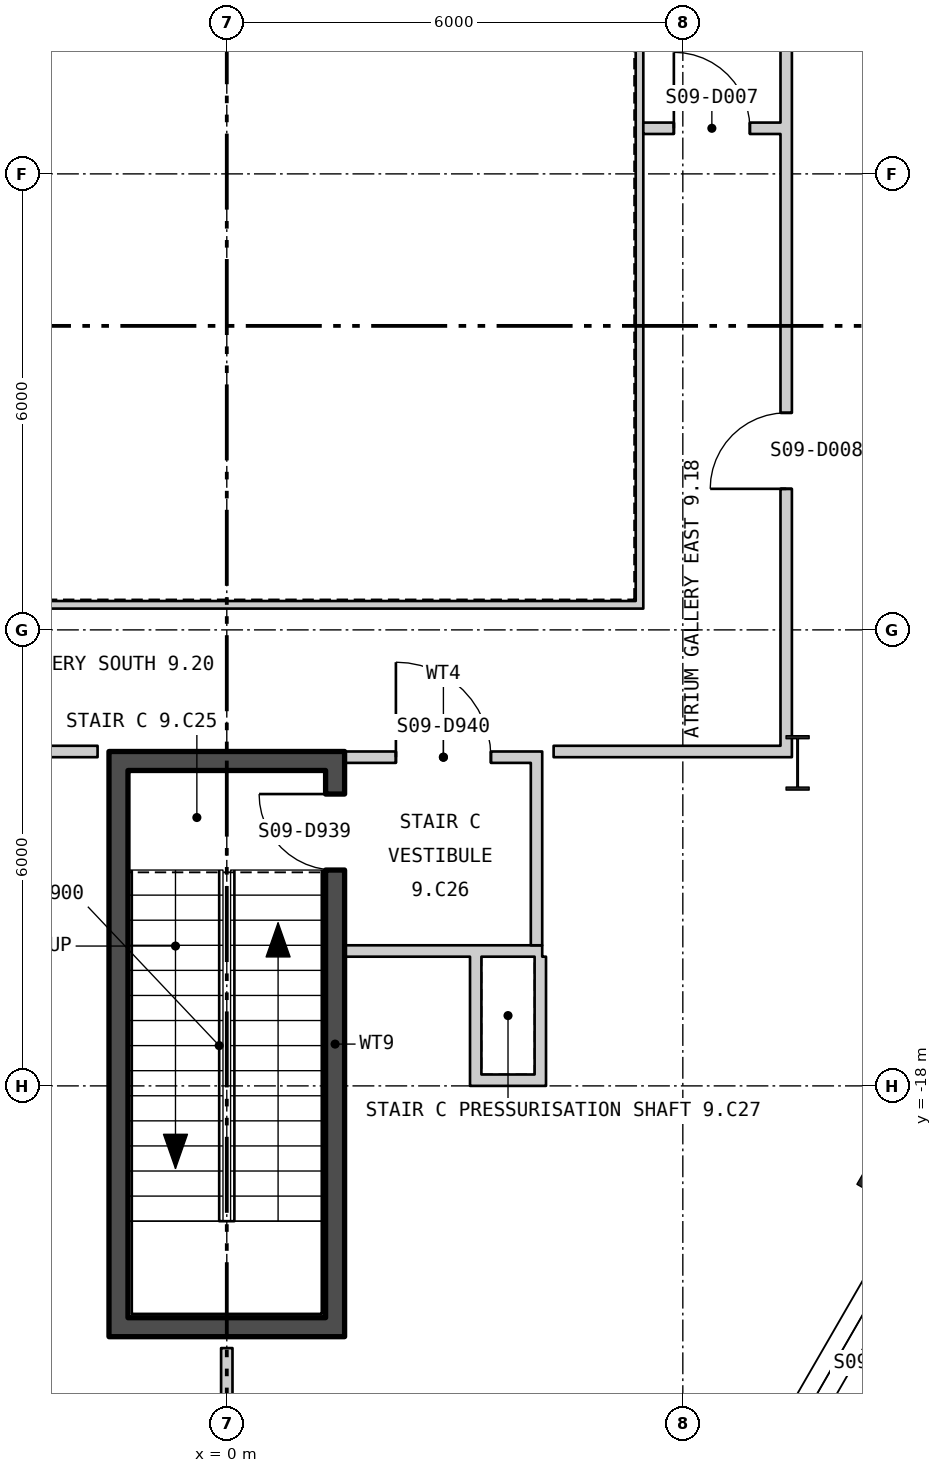
"""IFC4 building model, lengths in metres.
Left out: names, types, materials, properties, quantities, classifications, styles, units other than length and angle.
Written with IfcOpenShell. Run it as: python <this file> out.ifc"""

import sys

from ifc_helpers import new_model, si_unit, direction, frame, frame_2d, origin, origin_2d, place, context, subcontext, project, spatial, polyline, rectangle, hollow_rectangle, i_section, outline, extrude, element, fill, save


model = new_model("IFC4")
c1 = context("Model", 3, precision=1e-05, world=origin(), true_north=direction((0.0, 1.0)))
c2 = subcontext(c1, "Body", "Model", "MODEL_VIEW")
j1 = project(units=[si_unit("LENGTHUNIT", "METRE"), si_unit("PLANEANGLEUNIT", "RADIAN")], contexts=[c1])
p1 = place(None, origin())
s1 = spatial("IfcSite", under=j1, at=p1, CompositionType="ELEMENT")
p2 = place(p1, origin())
s2 = spatial("IfcBuilding", under=s1, at=p2, CompositionType="ELEMENT")
p3 = place(p2, frame((0.0, 0.0, 124.8)))
s3 = spatial("IfcBuildingStorey", under=s2, at=p3, CompositionType="ELEMENT", Elevation=124.8)
p4 = place(p3, frame((8.756, -19.188, 0.0), z_axis=(0.0, 0.0, 1.0), x_axis=(0.5, 0.866025403784, 0.0)))
e1 = element("IfcColumn", 1, at=p4, inside=s3, PredefinedType="COLUMN", context=c2, shape_type="SweptSolid", body=[
    extrude(hollow_rectangle(XDim=0.65, YDim=0.7, WallThickness=0.065, at=origin_2d()), origin(), (0.0, 0.0, 1.0), 4.5),
])
p5 = place(p3, frame((7.51, -13.75, 0.0), z_axis=(0.0, 0.0, 1.0), x_axis=(1.0, 0.0, 0.0)))
e2 = element("IfcColumn", 2, at=p5, inside=s3, PredefinedType="COLUMN", context=c2, shape_type="SweptSolid", body=[
    extrude(i_section(OverallWidth=0.304, OverallDepth=0.716, WebThickness=0.021, FlangeThickness=0.04, at=origin_2d()), origin(), (0.0, 0.0, 1.0), 4.5),
])
p6 = place(p3, frame((4.58, -27.57, -0.18), z_axis=(0.0, 0.0, 1.0), x_axis=(0.500000711659, 0.866024992908, 0.0)))
e3 = element("IfcWall", 3, at=p6, inside=s3, PredefinedType="SOLIDWALL", context=c2, shape_type="SweptSolid", body=[
    extrude(outline(polyline([(-0.13, -0.225), (45.87, -0.225), (45.61, 0.225), (0.13, 0.225), (-0.13, -0.225)])), origin(), (0.0, 0.0, 1.0), 4.28),
])
p7 = place(p6, frame((1.424, 0.0, 1.08)))
e4 = element("IfcOpeningElement", 4, at=p7, cuts=e3, PredefinedType="OPENING", context=c2, shape_type="SweptSolid", body=[
    extrude(rectangle(XDim=2.4, YDim=2.6, at=frame_2d((1.2, 1.3))), frame((0.0, 0.235, 0.0), z_axis=(0.0, -1.0, 0.0), x_axis=(1.0, 0.0, 0.0)), (0.0, 0.0, 1.0), 0.47),
])
p8 = place(p6, frame((5.893, 0.0, 1.08)))
e5 = element("IfcOpeningElement", 5, at=p8, cuts=e3, PredefinedType="OPENING", context=c2, shape_type="SweptSolid", body=[
    extrude(rectangle(XDim=2.4, YDim=2.6, at=frame_2d((1.2, 1.3))), frame((0.0, 0.235, 0.0), z_axis=(0.0, -1.0, 0.0), x_axis=(1.0, 0.0, 0.0)), (0.0, 0.0, 1.0), 0.47),
])
p9 = place(p6, frame((10.401, 0.0, 1.08)))
e6 = element("IfcOpeningElement", 6, at=p9, cuts=e3, PredefinedType="OPENING", context=c2, shape_type="SweptSolid", body=[
    extrude(rectangle(XDim=2.4, YDim=2.6, at=frame_2d((1.2, 1.3))), frame((0.0, 0.235, 0.0), z_axis=(0.0, -1.0, 0.0), x_axis=(1.0, 0.0, 0.0)), (0.0, 0.0, 1.0), 0.47),
])
p10 = place(p6, frame((14.909, 0.0, 1.08)))
e7 = element("IfcOpeningElement", 7, at=p10, cuts=e3, PredefinedType="OPENING", context=c2, shape_type="SweptSolid", body=[
    extrude(rectangle(XDim=2.4, YDim=2.6, at=frame_2d((1.2, 1.3))), frame((0.0, 0.235, 0.0), z_axis=(0.0, -1.0, 0.0), x_axis=(1.0, 0.0, 0.0)), (0.0, 0.0, 1.0), 0.47),
])
p11 = place(p6, frame((19.416, 0.0, 1.08)))
e8 = element("IfcOpeningElement", 8, at=p11, cuts=e3, PredefinedType="OPENING", context=c2, shape_type="SweptSolid", body=[
    extrude(rectangle(XDim=2.4, YDim=2.6, at=frame_2d((1.2, 1.3))), frame((0.0, 0.235, 0.0), z_axis=(0.0, -1.0, 0.0), x_axis=(1.0, 0.0, 0.0)), (0.0, 0.0, 1.0), 0.47),
])
p12 = place(p6, frame((23.924, 0.0, 1.08)))
e9 = element("IfcOpeningElement", 9, at=p12, cuts=e3, PredefinedType="OPENING", context=c2, shape_type="SweptSolid", body=[
    extrude(rectangle(XDim=2.4, YDim=2.6, at=frame_2d((1.2, 1.3))), frame((0.0, 0.235, 0.0), z_axis=(0.0, -1.0, 0.0), x_axis=(1.0, 0.0, 0.0)), (0.0, 0.0, 1.0), 0.47),
])
p13 = place(p6, frame((32.939, 0.0, 1.08)))
e10 = element("IfcOpeningElement", 10, at=p13, cuts=e3, PredefinedType="OPENING", context=c2, shape_type="SweptSolid", body=[
    extrude(rectangle(XDim=2.4, YDim=2.6, at=frame_2d((1.2, 1.3))), frame((0.0, 0.235, 0.0), z_axis=(0.0, -1.0, 0.0), x_axis=(1.0, 0.0, 0.0)), (0.0, 0.0, 1.0), 0.47),
])
p14 = place(p6, frame((37.447, 0.0, 1.08)))
e11 = element("IfcOpeningElement", 11, at=p14, cuts=e3, PredefinedType="OPENING", context=c2, shape_type="SweptSolid", body=[
    extrude(rectangle(XDim=2.4, YDim=2.6, at=frame_2d((1.2, 1.3))), frame((0.0, 0.235, 0.0), z_axis=(0.0, -1.0, 0.0), x_axis=(1.0, 0.0, 0.0)), (0.0, 0.0, 1.0), 0.47),
])
p15 = place(p6, frame((41.916, 0.0, 1.08)))
e12 = element("IfcOpeningElement", 12, at=p15, cuts=e3, PredefinedType="OPENING", context=c2, shape_type="SweptSolid", body=[
    extrude(rectangle(XDim=2.4, YDim=2.6, at=frame_2d((1.2, 1.3))), frame((0.0, 0.235, 0.0), z_axis=(0.0, -1.0, 0.0), x_axis=(1.0, 0.0, 0.0)), (0.0, 0.0, 1.0), 0.47),
])
p16 = place(p3, frame((-5.48, -11.67, 0.0), z_axis=(0.0, 0.0, 1.0), x_axis=(1.0, 0.0, 0.0)))
e13 = element("IfcWall", 13, at=p16, inside=s3, PredefinedType="PARTITIONING", context=c2, shape_type="SweptSolid", body=[
    extrude(rectangle(XDim=10.96, YDim=0.1, at=frame_2d((5.48, 0.0))), origin(), (0.0, 0.0, 1.0), 4.3),
])
p17 = place(p3, frame((5.43, -11.62, 0.0), z_axis=(0.0, 0.0, 1.0), x_axis=(0.0, 1.0, 0.0)))
e14 = element("IfcWall", 14, at=p17, inside=s3, PredefinedType="PARTITIONING", context=c2, shape_type="SweptSolid", body=[
    extrude(rectangle(XDim=8.04, YDim=0.1, at=frame_2d((4.02, 0.0))), origin(), (0.0, 0.0, 1.0), 4.3),
])
p18 = place(p3, frame((-1.425, -21.05, 0.0), z_axis=(0.0, 0.0, 1.0), x_axis=(0.0, 1.0, 0.0)))
e15 = element("IfcWall", 15, at=p18, inside=s3, PredefinedType="SHEAR", context=c2, shape_type="SweptSolid", body=[
    extrude(rectangle(XDim=7.2, YDim=0.25, at=frame_2d((3.6, 0.0))), origin(), (0.0, 0.0, 1.0), 4.3),
])
p19 = place(p3, frame((1.425, -21.05, 0.0), z_axis=(0.0, 0.0, 1.0), x_axis=(0.0, 1.0, 0.0)))
e16 = element("IfcWall", 16, at=p19, inside=s3, PredefinedType="SHEAR", context=c2, shape_type="SweptSolid", body=[
    extrude(rectangle(XDim=7.2, YDim=0.25, at=frame_2d((3.6, 0.0))), origin(), (0.0, 0.0, 1.0), 4.3),
])
p20 = place(p19, frame((5.89, 0.0, 0.0)))
e17 = element("IfcOpeningElement", 17, at=p20, cuts=e16, PredefinedType="OPENING", context=c2, shape_type="SweptSolid", body=[
    extrude(rectangle(XDim=1.0, YDim=2.1, at=frame_2d((0.5, 1.05))), frame((0.0, 0.135, 0.0), z_axis=(0.0, -1.0, 0.0), x_axis=(1.0, 0.0, 0.0)), (0.0, 0.0, 1.0), 0.27),
])
for number, where, z_axis, x_axis in (
    (18, (-1.55, -21.175, 0.0), (0.0, 0.0, 1.0), (1.0, 0.0, 0.0)),
    (19, (-1.55, -13.725, 0.0), (0.0, 0.0, 1.0), (1.0, 0.0, 0.0)),
):
    element("IfcWall", number, at=place(p3, frame(where, z_axis=z_axis, x_axis=x_axis)), inside=s3, PredefinedType="SHEAR", context=c2, shape_type="SweptSolid", body=[
        extrude(rectangle(XDim=3.1, YDim=0.25, at=frame_2d((1.55, 0.0))), origin(), (0.0, 0.0, 1.0), 4.3),
    ])
p21 = place(p3, frame((1.55, -16.225, 0.0), z_axis=(0.0, 0.0, 1.0), x_axis=(1.0, 0.0, 0.0)))
e20 = element("IfcWall", 20, at=p21, inside=s3, PredefinedType="PARTITIONING", context=c2, shape_type="SweptSolid", body=[
    extrude(rectangle(XDim=2.6, YDim=0.15, at=frame_2d((1.3, 0.0))), origin(), (0.0, 0.0, 1.0), 4.3),
])
p22 = place(p3, frame((4.075, -16.15, 0.0), z_axis=(0.0, 0.0, 1.0), x_axis=(0.0, 1.0, 0.0)))
e21 = element("IfcWall", 21, at=p22, inside=s3, PredefinedType="PARTITIONING", context=c2, shape_type="SweptSolid", body=[
    extrude(rectangle(XDim=2.4, YDim=0.15, at=frame_2d((1.2, 0.0))), origin(), (0.0, 0.0, 1.0), 4.3),
])
p23 = place(p3, frame((1.55, -13.675, 0.0), z_axis=(0.0, 0.0, 1.0), x_axis=(1.0, 0.0, 0.0)))
e22 = element("IfcWall", 22, at=p23, inside=s3, PredefinedType="PARTITIONING", context=c2, shape_type="SweptSolid", body=[
    extrude(rectangle(XDim=2.6, YDim=0.15, at=frame_2d((1.3, 0.0))), origin(), (0.0, 0.0, 1.0), 3.39),
])
p24 = place(p23, frame((0.675, 0.0, 0.0)))
e23 = element("IfcOpeningElement", 23, at=p24, cuts=e22, PredefinedType="OPENING", context=c2, shape_type="SweptSolid", body=[
    extrude(rectangle(XDim=1.25, YDim=2.1, at=frame_2d((0.625, 1.05))), frame((0.0, 0.085, 0.0), z_axis=(0.0, -1.0, 0.0), x_axis=(1.0, 0.0, 0.0)), (0.0, 0.0, 1.0), 0.17),
])
p25 = place(p3, frame((3.275, -18.0, 0.0), z_axis=(0.0, 0.0, 1.0), x_axis=(0.0, 1.0, 0.0)))
e24 = element("IfcWall", 24, at=p25, inside=s3, PredefinedType="PARTITIONING", context=c2, shape_type="SweptSolid", body=[
    extrude(rectangle(XDim=1.7, YDim=0.15, at=frame_2d((0.85, 0.0))), origin(), (0.0, 0.0, 1.0), 3.61),
])
p26 = place(p3, frame((3.35, -17.925, 0.0), z_axis=(0.0, 0.0, 1.0), x_axis=(1.0, 0.0, 0.0)))
e25 = element("IfcWall", 25, at=p26, inside=s3, PredefinedType="PARTITIONING", context=c2, shape_type="SweptSolid", body=[
    extrude(rectangle(XDim=0.7, YDim=0.15, at=frame_2d((0.35, 0.0))), origin(), (0.0, 0.0, 1.0), 4.3),
])
p27 = place(p3, frame((4.125, -18.0, 0.0), z_axis=(0.0, 0.0, 1.0), x_axis=(0.0, 1.0, 0.0)))
e26 = element("IfcWall", 26, at=p27, inside=s3, PredefinedType="PARTITIONING", context=c2, shape_type="SweptSolid", body=[
    extrude(rectangle(XDim=1.7, YDim=0.15, at=frame_2d((0.85, 0.0))), origin(), (0.0, 0.0, 1.0), 4.3),
])
p28 = place(p3, frame((-7.285, -13.6, 0.0), z_axis=(0.0, 0.0, 1.0), x_axis=(1.0, 0.0, 0.0)))
e27 = element("IfcWall", 27, at=p28, inside=s3, PredefinedType="PARTITIONING", context=c2, shape_type="SweptSolid", body=[
    extrude(rectangle(XDim=5.585, YDim=0.15, at=frame_2d((2.792, 0.0))), origin(), (0.0, 0.0, 1.0), 3.39),
])
p29 = place(p28, frame((3.224, 0.0, 0.0)))
e28 = element("IfcOpeningElement", 28, at=p29, cuts=e27, PredefinedType="OPENING", context=c2, shape_type="SweptSolid", body=[
    extrude(rectangle(XDim=1.0, YDim=2.1, at=frame_2d((0.5, 1.05))), frame((0.0, 0.085, 0.0), z_axis=(0.0, -1.0, 0.0), x_axis=(1.0, 0.0, 0.0)), (0.0, 0.0, 1.0), 0.17),
])
p30 = place(p3, frame((0.0, -26.895, 0.0), z_axis=(0.0, 0.0, 1.0), x_axis=(0.0, 1.0, 0.0)))
e29 = element("IfcWall", 29, at=p30, inside=s3, PredefinedType="PARTITIONING", context=c2, shape_type="SweptSolid", body=[
    extrude(rectangle(XDim=5.445, YDim=0.15, at=frame_2d((2.723, 0.0))), origin(), (0.0, 0.0, 1.0), 3.7),
])
p31 = place(p3, frame((4.3, -13.6, 0.0), z_axis=(0.0, 0.0, 1.0), x_axis=(1.0, 0.0, 0.0)))
e30 = element("IfcWall", 30, at=p31, inside=s3, PredefinedType="PARTITIONING", context=c2, shape_type="SweptSolid", body=[
    extrude(rectangle(XDim=2.985, YDim=0.15, at=frame_2d((1.492, 0.0))), origin(), (0.0, 0.0, 1.0), 3.39),
])
p32 = place(p3, frame((5.48, -5.4, 0.0), z_axis=(0.0, 0.0, 1.0), x_axis=(1.0, 0.0, 0.0)))
e31 = element("IfcWall", 31, at=p32, inside=s3, PredefinedType="PARTITIONING", context=c2, shape_type="SweptSolid", body=[
    extrude(rectangle(XDim=1.805, YDim=0.15, at=frame_2d((0.902, 0.0))), origin(), (0.0, 0.0, 1.0), 4.3),
])
p33 = place(p32, frame((0.402, 0.0, 0.0)))
e32 = element("IfcOpeningElement", 32, at=p33, cuts=e31, PredefinedType="OPENING", context=c2, shape_type="SweptSolid", body=[
    extrude(rectangle(XDim=1.0, YDim=2.1, at=frame_2d((0.5, 1.05))), frame((0.0, 0.085, 0.0), z_axis=(0.0, -1.0, 0.0), x_axis=(1.0, 0.0, 0.0)), (0.0, 0.0, 1.0), 0.17),
])
p34 = place(p3, frame((7.36, -13.675, 0.0), z_axis=(0.0, 0.0, 1.0), x_axis=(0.0, 1.0, 0.0)))
e33 = element("IfcWall", 33, at=p34, inside=s3, PredefinedType="PARTITIONING", context=c2, shape_type="SweptSolid", body=[
    extrude(rectangle(XDim=10.167, YDim=0.15, at=frame_2d((5.083, 0.0))), origin(), (0.0, 0.0, 1.0), 3.7),
])
p35 = place(p34, frame((3.531, 0.0, 0.0)))
e34 = element("IfcOpeningElement", 34, at=p35, cuts=e33, PredefinedType="OPENING", context=c2, shape_type="SweptSolid", body=[
    extrude(rectangle(XDim=1.0, YDim=2.1, at=frame_2d((0.5, 1.05))), frame((0.0, 0.085, 0.0), z_axis=(0.0, -1.0, 0.0), x_axis=(1.0, 0.0, 0.0)), (0.0, 0.0, 1.0), 0.17),
])
p36 = place(p8, origin())
e35 = element("IfcWindow", 35, at=p36, inside=s3, PartitioningType="SINGLE_PANEL", PredefinedType="WINDOW", context=c2, shape_type="SweptSolid", body=[
    extrude(rectangle(XDim=2.4, YDim=2.6, at=frame_2d((1.2, 1.3))), frame((0.0, 0.105, 0.0), z_axis=(0.0, -1.0, 0.0), x_axis=(1.0, 0.0, 0.0)), (0.0, 0.0, 1.0), 0.06),
])
fill(e5, e35)
p37 = place(p20, origin())
e36 = element("IfcDoor", 36, at=p37, inside=s3, OperationType="SINGLE_SWING_LEFT", PredefinedType="DOOR", context=c2, shape_type="SweptSolid", body=[
    extrude(rectangle(XDim=1.0, YDim=2.1, at=frame_2d((0.5, 1.05))), frame((0.0, 0.025, 0.0), z_axis=(0.0, -1.0, 0.0), x_axis=(1.0, 0.0, 0.0)), (0.0, 0.0, 1.0), 0.05),
])
fill(e17, e36)
p38 = place(p24, origin())
e37 = element("IfcDoor", 37, at=p38, inside=s3, OperationType="SINGLE_SWING_RIGHT", PredefinedType="DOOR", context=c2, shape_type="SweptSolid", body=[
    extrude(rectangle(XDim=1.25, YDim=2.1, at=frame_2d((0.625, 1.05))), frame((0.0, 0.025, 0.0), z_axis=(0.0, -1.0, 0.0), x_axis=(1.0, 0.0, 0.0)), (0.0, 0.0, 1.0), 0.05),
])
fill(e23, e37)
p39 = place(p33, origin())
e38 = element("IfcDoor", 38, at=p39, inside=s3, OperationType="SINGLE_SWING_RIGHT", PredefinedType="DOOR", context=c2, shape_type="SweptSolid", body=[
    extrude(rectangle(XDim=1.0, YDim=2.1, at=frame_2d((0.5, 1.05))), frame((0.0, 0.025, 0.0), z_axis=(0.0, -1.0, 0.0), x_axis=(1.0, 0.0, 0.0)), (0.0, 0.0, 1.0), 0.05),
])
fill(e32, e38)
p40 = place(p35, origin())
e39 = element("IfcDoor", 39, at=p40, inside=s3, OperationType="SINGLE_SWING_RIGHT", PredefinedType="DOOR", context=c2, shape_type="SweptSolid", body=[
    extrude(rectangle(XDim=1.0, YDim=2.1, at=frame_2d((0.5, 1.05))), frame((0.0, 0.025, 0.0), z_axis=(0.0, -1.0, 0.0), x_axis=(1.0, 0.0, 0.0)), (0.0, 0.0, 1.0), 0.05),
])
fill(e34, e39)
save(model, sys.argv[1])
